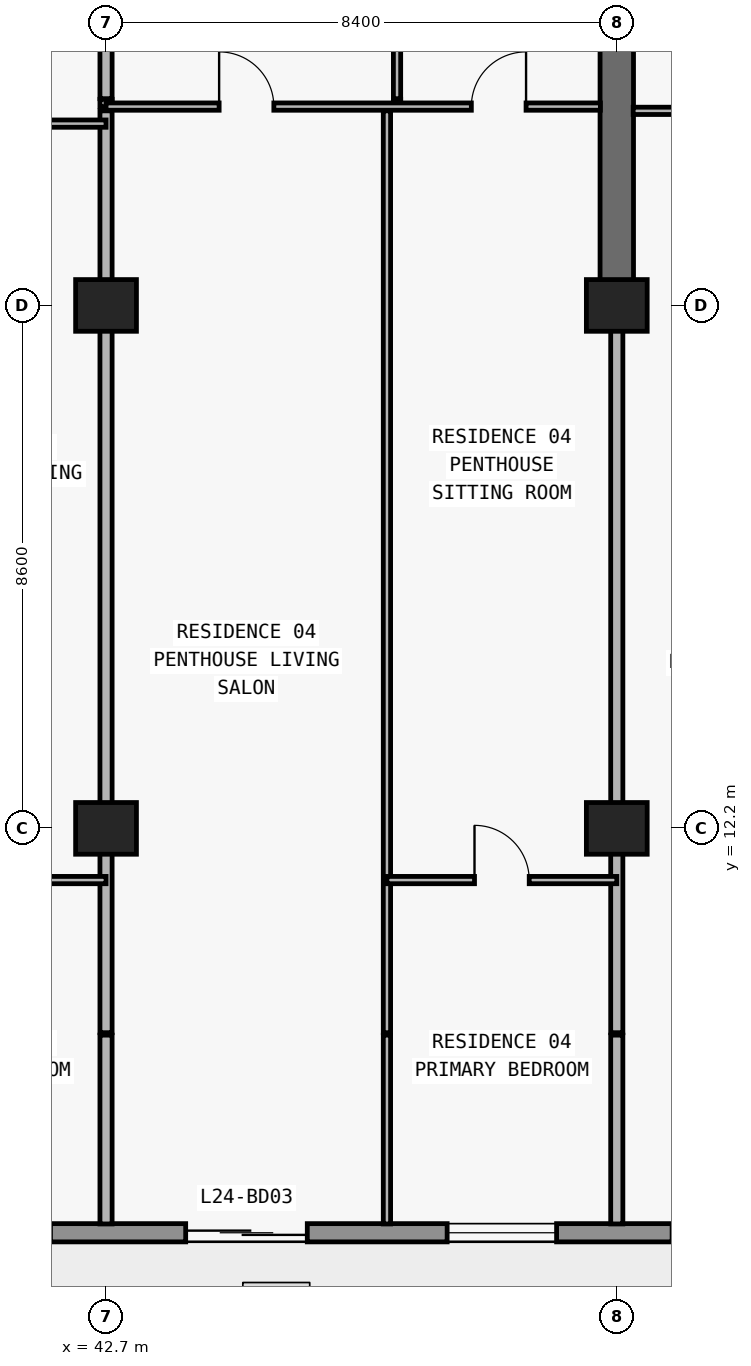
"""IFC4 building model, lengths in metres.
Left out: names, types, materials, properties, quantities, classifications, styles, units other than length and angle.
Written with IfcOpenShell. Run it as: python <this file> out.ifc"""

import sys

from ifc_helpers import new_model, si_unit, direction, frame, frame_2d, origin, origin_2d, place, context, subcontext, project, spatial, rectangle, extrude, element, fill, save


model = new_model("IFC4")
c1 = context("Model", 3, precision=1e-05, world=origin(), true_north=direction((0.0, 1.0)))
c2 = subcontext(c1, "Body", "Model", "MODEL_VIEW")
j1 = project(units=[si_unit("LENGTHUNIT", "METRE"), si_unit("PLANEANGLEUNIT", "RADIAN")], contexts=[c1])
p1 = place(None, origin())
s1 = spatial("IfcSite", under=j1, at=p1, CompositionType="ELEMENT")
p2 = place(p1, origin())
s2 = spatial("IfcBuilding", under=s1, at=p2, CompositionType="ELEMENT")
p3 = place(p2, frame((0.0, 0.0, 91.2)))
s3 = spatial("IfcBuildingStorey", under=s2, at=p3, CompositionType="ELEMENT", Elevation=91.2)
for number, where, z_axis, x_axis in (
    (1, (42.7, 12.2, 0.0), (0.0, 0.0, 1.0), (1.0, 0.0, 0.0)),
    (2, (51.1, 12.2, 0.0), (0.0, 0.0, 1.0), (1.0, 0.0, 0.0)),
    (3, (42.7, 20.8, 0.0), (0.0, 0.0, 1.0), (1.0, 0.0, 0.0)),
    (4, (51.1, 20.8, 0.0), (0.0, 0.0, 1.0), (1.0, 0.0, 0.0)),
):
    element("IfcColumn", number, at=place(p3, frame(where, z_axis=z_axis, x_axis=x_axis)), inside=s3, PredefinedType="COLUMN", context=c2, shape_type="SweptSolid", body=[
        extrude(rectangle(XDim=1.0, YDim=0.85, at=origin_2d()), origin(), (0.0, 0.0, 1.0), 3.05),
    ])
p4 = place(p3, frame((51.1, 20.8, 0.0), z_axis=(0.0, 0.0, 1.0), x_axis=(0.0, 1.0, 0.0)))
e5 = element("IfcWall", 5, at=p4, inside=s3, PredefinedType="SHEAR", context=c2, shape_type="SweptSolid", body=[
    extrude(rectangle(XDim=8.6, YDim=0.55, at=frame_2d((4.3, 0.0))), origin(), (0.0, 0.0, 1.0), 3.05),
])
p5 = place(p3, frame((70.1, 5.55, 0.0), z_axis=(0.0, 0.0, 1.0), x_axis=(-1.0, 0.0, 0.0)))
e6 = element("IfcWall", 6, at=p5, inside=s3, PredefinedType="STANDARD", context=c2, shape_type="SweptSolid", body=[
    extrude(rectangle(XDim=62.4, YDim=0.3, at=frame_2d((31.2, 0.0))), origin(), (0.0, 0.0, 1.0), 3.05),
])
p6 = place(p5, frame((57.29, 0.0, 0.0)))
e7 = element("IfcOpeningElement", 7, at=p6, cuts=e6, PredefinedType="OPENING", context=c2, shape_type="SweptSolid", body=[
    extrude(rectangle(XDim=2.0, YDim=2.3, at=frame_2d((1.0, 1.15))), frame((0.0, 0.16, 0.0), z_axis=(0.0, -1.0, 0.0), x_axis=(1.0, 0.0, 0.0)), (0.0, 0.0, 1.0), 0.32),
])
p7 = place(p5, frame((52.61, 0.0, 0.65)))
e8 = element("IfcOpeningElement", 8, at=p7, cuts=e6, PredefinedType="OPENING", context=c2, shape_type="SweptSolid", body=[
    extrude(rectangle(XDim=2.6, YDim=1.85, at=frame_2d((1.3, 0.925))), frame((0.0, 0.16, 0.0), z_axis=(0.0, -1.0, 0.0), x_axis=(1.0, 0.0, 0.0)), (0.0, 0.0, 1.0), 0.32),
])
p8 = place(p5, frame((46.5, 0.0, 0.85)))
e9 = element("IfcOpeningElement", 9, at=p8, cuts=e6, PredefinedType="OPENING", context=c2, shape_type="SweptSolid", body=[
    extrude(rectangle(XDim=2.2, YDim=1.55, at=frame_2d((1.1, 0.775))), frame((0.0, 0.16, 0.0), z_axis=(0.0, -1.0, 0.0), x_axis=(1.0, 0.0, 0.0)), (0.0, 0.0, 1.0), 0.32),
])
p9 = place(p5, frame((40.09, 0.0, 0.0)))
e10 = element("IfcOpeningElement", 10, at=p9, cuts=e6, PredefinedType="OPENING", context=c2, shape_type="SweptSolid", body=[
    extrude(rectangle(XDim=2.0, YDim=2.3, at=frame_2d((1.0, 1.15))), frame((0.0, 0.16, 0.0), z_axis=(0.0, -1.0, 0.0), x_axis=(1.0, 0.0, 0.0)), (0.0, 0.0, 1.0), 0.32),
])
p10 = place(p5, frame((35.99, 0.0, 0.85)))
e11 = element("IfcOpeningElement", 11, at=p10, cuts=e6, PredefinedType="OPENING", context=c2, shape_type="SweptSolid", body=[
    extrude(rectangle(XDim=1.8, YDim=1.55, at=frame_2d((0.9, 0.775))), frame((0.0, 0.16, 0.0), z_axis=(0.0, -1.0, 0.0), x_axis=(1.0, 0.0, 0.0)), (0.0, 0.0, 1.0), 0.32),
])
p11 = place(p5, frame((28.314, 0.0, 0.85)))
e12 = element("IfcOpeningElement", 12, at=p11, cuts=e6, PredefinedType="OPENING", context=c2, shape_type="SweptSolid", body=[
    extrude(rectangle(XDim=2.2, YDim=1.55, at=frame_2d((1.1, 0.775))), frame((0.0, 0.16, 0.0), z_axis=(0.0, -1.0, 0.0), x_axis=(1.0, 0.0, 0.0)), (0.0, 0.0, 1.0), 0.32),
])
p12 = place(p5, frame((24.09, 0.0, 0.0)))
e13 = element("IfcOpeningElement", 13, at=p12, cuts=e6, PredefinedType="OPENING", context=c2, shape_type="SweptSolid", body=[
    extrude(rectangle(XDim=2.0, YDim=2.3, at=frame_2d((1.0, 1.15))), frame((0.0, 0.16, 0.0), z_axis=(0.0, -1.0, 0.0), x_axis=(1.0, 0.0, 0.0)), (0.0, 0.0, 1.0), 0.32),
])
p13 = place(p5, frame((19.99, 0.0, 0.85)))
e14 = element("IfcOpeningElement", 14, at=p13, cuts=e6, PredefinedType="OPENING", context=c2, shape_type="SweptSolid", body=[
    extrude(rectangle(XDim=1.8, YDim=1.55, at=frame_2d((0.9, 0.775))), frame((0.0, 0.16, 0.0), z_axis=(0.0, -1.0, 0.0), x_axis=(1.0, 0.0, 0.0)), (0.0, 0.0, 1.0), 0.32),
])
p14 = place(p5, frame((16.09, 0.0, 0.0)))
e15 = element("IfcOpeningElement", 15, at=p14, cuts=e6, PredefinedType="OPENING", context=c2, shape_type="SweptSolid", body=[
    extrude(rectangle(XDim=2.0, YDim=2.3, at=frame_2d((1.0, 1.15))), frame((0.0, 0.16, 0.0), z_axis=(0.0, -1.0, 0.0), x_axis=(1.0, 0.0, 0.0)), (0.0, 0.0, 1.0), 0.32),
])
p15 = place(p5, frame((11.41, 0.0, 0.65)))
e16 = element("IfcOpeningElement", 16, at=p15, cuts=e6, PredefinedType="OPENING", context=c2, shape_type="SweptSolid", body=[
    extrude(rectangle(XDim=2.6, YDim=1.85, at=frame_2d((1.3, 0.925))), frame((0.0, 0.16, 0.0), z_axis=(0.0, -1.0, 0.0), x_axis=(1.0, 0.0, 0.0)), (0.0, 0.0, 1.0), 0.32),
])
p16 = place(p5, frame((5.3, 0.0, 0.85)))
e17 = element("IfcOpeningElement", 17, at=p16, cuts=e6, PredefinedType="OPENING", context=c2, shape_type="SweptSolid", body=[
    extrude(rectangle(XDim=2.2, YDim=1.55, at=frame_2d((1.1, 0.775))), frame((0.0, 0.16, 0.0), z_axis=(0.0, -1.0, 0.0), x_axis=(1.0, 0.0, 0.0)), (0.0, 0.0, 1.0), 0.32),
])
p17 = place(p3, frame((42.7, 5.695, 0.0), z_axis=(0.0, 0.0, 1.0), x_axis=(0.0, 1.0, 0.0)))
e18 = element("IfcWall", 18, at=p17, inside=s3, PredefinedType="PARTITIONING", context=c2, shape_type="SweptSolid", body=[
    extrude(rectangle(XDim=3.105, YDim=0.2, at=frame_2d((1.552, 0.0))), origin(), (0.0, 0.0, 1.0), 3.05),
])
p18 = place(p3, frame((42.7, 8.84, 0.0), z_axis=(0.0, 0.0, 1.0), x_axis=(0.0, 1.0, 0.0)))
e19 = element("IfcWall", 19, at=p18, inside=s3, PredefinedType="PARTITIONING", context=c2, shape_type="SweptSolid", body=[
    extrude(rectangle(XDim=15.16, YDim=0.2, at=frame_2d((7.58, 0.0))), origin(), (0.0, 0.0, 1.0), 2.174),
])
p19 = place(p3, frame((42.7, 24.07, 0.0), z_axis=(0.0, 0.0, 1.0), x_axis=(0.0, 1.0, 0.0)))
e20 = element("IfcWall", 20, at=p19, inside=s3, PredefinedType="PARTITIONING", context=c2, shape_type="SweptSolid", body=[
    extrude(rectangle(XDim=0.12, YDim=0.2, at=frame_2d((0.06, 0.0))), origin(), (0.0, 0.0, 1.0), 2.174),
])
p20 = place(p3, frame((42.7, 24.2, 0.0), z_axis=(0.0, 0.0, 1.0), x_axis=(0.0, 1.0, 0.0)))
e21 = element("IfcWall", 21, at=p20, inside=s3, PredefinedType="PARTITIONING", context=c2, shape_type="SweptSolid", body=[
    extrude(rectangle(XDim=5.14, YDim=0.2, at=frame_2d((2.57, 0.0))), origin(), (0.0, 0.0, 1.0), 2.174),
])
p21 = place(p3, frame((47.32, 5.695, 0.0), z_axis=(0.0, 0.0, 1.0), x_axis=(0.0, 1.0, 0.0)))
e22 = element("IfcWall", 22, at=p21, inside=s3, PredefinedType="PARTITIONING", context=c2, shape_type="SweptSolid", body=[
    extrude(rectangle(XDim=3.105, YDim=0.12, at=frame_2d((1.552, 0.0))), origin(), (0.0, 0.0, 1.0), 3.05),
])
p22 = place(p3, frame((47.32, 8.84, 0.0), z_axis=(0.0, 0.0, 1.0), x_axis=(0.0, 1.0, 0.0)))
e23 = element("IfcWall", 23, at=p22, inside=s3, PredefinedType="PARTITIONING", context=c2, shape_type="SweptSolid", body=[
    extrude(rectangle(XDim=15.16, YDim=0.12, at=frame_2d((7.58, 0.0))), origin(), (0.0, 0.0, 1.0), 3.05),
])
p23 = place(p3, frame((47.486, 24.07, 0.0), z_axis=(0.0, 0.0, 1.0), x_axis=(0.0, 1.0, 0.0)))
e24 = element("IfcWall", 24, at=p23, inside=s3, PredefinedType="PARTITIONING", context=c2, shape_type="SweptSolid", body=[
    extrude(rectangle(XDim=0.12, YDim=0.12, at=frame_2d((0.06, 0.0))), origin(), (0.0, 0.0, 1.0), 3.05),
])
p24 = place(p3, frame((47.486, 24.2, 0.0), z_axis=(0.0, 0.0, 1.0), x_axis=(0.0, 1.0, 0.0)))
e25 = element("IfcWall", 25, at=p24, inside=s3, PredefinedType="PARTITIONING", context=c2, shape_type="SweptSolid", body=[
    extrude(rectangle(XDim=5.02, YDim=0.12, at=frame_2d((2.51, 0.0))), origin(), (0.0, 0.0, 1.0), 3.05),
])
p25 = place(p24, frame((2.06, 0.0, 0.0)))
e26 = element("IfcOpeningElement", 26, at=p25, cuts=e25, PredefinedType="OPENING", context=c2, shape_type="SweptSolid", body=[
    extrude(rectangle(XDim=0.9, YDim=2.15, at=frame_2d((0.45, 1.075))), frame((0.0, 0.07, 0.0), z_axis=(0.0, -1.0, 0.0), x_axis=(1.0, 0.0, 0.0)), (0.0, 0.0, 1.0), 0.14),
])
p26 = place(p3, frame((51.1, 5.695, 0.0), z_axis=(0.0, 0.0, 1.0), x_axis=(0.0, 1.0, 0.0)))
e27 = element("IfcWall", 27, at=p26, inside=s3, PredefinedType="PARTITIONING", context=c2, shape_type="SweptSolid", body=[
    extrude(rectangle(XDim=3.105, YDim=0.2, at=frame_2d((1.552, 0.0))), origin(), (0.0, 0.0, 1.0), 3.05),
])
p27 = place(p3, frame((51.1, 8.84, 0.0), z_axis=(0.0, 0.0, 1.0), x_axis=(0.0, 1.0, 0.0)))
e28 = element("IfcWall", 28, at=p27, inside=s3, PredefinedType="PARTITIONING", context=c2, shape_type="SweptSolid", body=[
    extrude(rectangle(XDim=11.955, YDim=0.2, at=frame_2d((5.978, 0.0))), origin(), (0.0, 0.0, 1.0), 2.174),
])
p28 = place(p3, frame((38.672, 11.35, 0.0), z_axis=(0.0, 0.0, 1.0), x_axis=(1.0, 0.0, 0.0)))
e29 = element("IfcWall", 29, at=p28, inside=s3, PredefinedType="PARTITIONING", context=c2, shape_type="SweptSolid", body=[
    extrude(rectangle(XDim=4.028, YDim=0.12, at=frame_2d((2.014, 0.0))), origin(), (0.0, 0.0, 1.0), 3.05),
])
p29 = place(p28, frame((1.564, 0.0, 0.0)))
e30 = element("IfcOpeningElement", 30, at=p29, cuts=e29, PredefinedType="OPENING", context=c2, shape_type="SweptSolid", body=[
    extrude(rectangle(XDim=0.9, YDim=2.15, at=frame_2d((0.45, 1.075))), frame((0.0, 0.07, 0.0), z_axis=(0.0, -1.0, 0.0), x_axis=(1.0, 0.0, 0.0)), (0.0, 0.0, 1.0), 0.14),
])
p30 = place(p3, frame((47.32, 11.35, 0.0), z_axis=(0.0, 0.0, 1.0), x_axis=(1.0, 0.0, 0.0)))
e31 = element("IfcWall", 31, at=p30, inside=s3, PredefinedType="PARTITIONING", context=c2, shape_type="SweptSolid", body=[
    extrude(rectangle(XDim=3.78, YDim=0.12, at=frame_2d((1.89, 0.0))), origin(), (0.0, 0.0, 1.0), 3.05),
])
p31 = place(p30, frame((1.44, 0.0, 0.0)))
e32 = element("IfcOpeningElement", 32, at=p31, cuts=e31, PredefinedType="OPENING", context=c2, shape_type="SweptSolid", body=[
    extrude(rectangle(XDim=0.9, YDim=2.15, at=frame_2d((0.45, 1.075))), frame((0.0, 0.07, 0.0), z_axis=(0.0, -1.0, 0.0), x_axis=(1.0, 0.0, 0.0)), (0.0, 0.0, 1.0), 0.14),
])
p32 = place(p3, frame((35.1, 23.79, 0.0), z_axis=(0.0, 0.0, 1.0), x_axis=(1.0, 0.0, 0.0)))
e33 = element("IfcWall", 33, at=p32, inside=s3, PredefinedType="PARTITIONING", context=c2, shape_type="SweptSolid", body=[
    extrude(rectangle(XDim=7.6, YDim=0.12, at=frame_2d((3.8, 0.0))), origin(), (0.0, 0.0, 1.0), 3.05),
])
p33 = place(p32, frame((1.336, 0.0, 0.0)))
e34 = element("IfcOpeningElement", 34, at=p33, cuts=e33, PredefinedType="OPENING", context=c2, shape_type="SweptSolid", body=[
    extrude(rectangle(XDim=0.9, YDim=2.15, at=frame_2d((0.45, 1.075))), frame((0.0, 0.07, 0.0), z_axis=(0.0, -1.0, 0.0), x_axis=(1.0, 0.0, 0.0)), (0.0, 0.0, 1.0), 0.14),
])
p34 = place(p32, frame((5.402, 0.0, 0.0)))
e35 = element("IfcOpeningElement", 35, at=p34, cuts=e33, PredefinedType="OPENING", context=c2, shape_type="SweptSolid", body=[
    extrude(rectangle(XDim=0.9, YDim=2.15, at=frame_2d((0.45, 1.075))), frame((0.0, 0.07, 0.0), z_axis=(0.0, -1.0, 0.0), x_axis=(1.0, 0.0, 0.0)), (0.0, 0.0, 1.0), 0.14),
])
p35 = place(p3, frame((51.37, 24.0, 0.0), z_axis=(0.0, 0.0, 1.0), x_axis=(1.0, 0.0, 0.0)))
e36 = element("IfcWall", 36, at=p35, inside=s3, PredefinedType="PARTITIONING", context=c2, shape_type="SweptSolid", body=[
    extrude(rectangle(XDim=8.13, YDim=0.12, at=frame_2d((4.065, 0.0))), origin(), (0.0, 0.0, 1.0), 3.05),
])
p36 = place(p35, frame((1.305, 0.0, 0.0)))
e37 = element("IfcOpeningElement", 37, at=p36, cuts=e36, PredefinedType="OPENING", context=c2, shape_type="SweptSolid", body=[
    extrude(rectangle(XDim=0.9, YDim=2.15, at=frame_2d((0.45, 1.075))), frame((0.0, 0.07, 0.0), z_axis=(0.0, -1.0, 0.0), x_axis=(1.0, 0.0, 0.0)), (0.0, 0.0, 1.0), 0.14),
])
p37 = place(p3, frame((42.7, 24.07, 0.0), z_axis=(0.0, 0.0, 1.0), x_axis=(1.0, 0.0, 0.0)))
e38 = element("IfcWall", 38, at=p37, inside=s3, PredefinedType="PARTITIONING", context=c2, shape_type="SweptSolid", body=[
    extrude(rectangle(XDim=8.13, YDim=0.12, at=frame_2d((4.065, 0.0))), origin(), (0.0, 0.0, 1.0), 3.05),
])
p38 = place(p37, frame((1.86, 0.0, 0.0)))
e39 = element("IfcOpeningElement", 39, at=p38, cuts=e38, PredefinedType="OPENING", context=c2, shape_type="SweptSolid", body=[
    extrude(rectangle(XDim=0.9, YDim=2.15, at=frame_2d((0.45, 1.075))), frame((0.0, 0.07, 0.0), z_axis=(0.0, -1.0, 0.0), x_axis=(1.0, 0.0, 0.0)), (0.0, 0.0, 1.0), 0.14),
])
p39 = place(p37, frame((6.008, 0.0, 0.0)))
e40 = element("IfcOpeningElement", 40, at=p39, cuts=e38, PredefinedType="OPENING", context=c2, shape_type="SweptSolid", body=[
    extrude(rectangle(XDim=0.9, YDim=2.15, at=frame_2d((0.45, 1.075))), frame((0.0, 0.07, 0.0), z_axis=(0.0, -1.0, 0.0), x_axis=(1.0, 0.0, 0.0)), (0.0, 0.0, 1.0), 0.14),
])
p40 = place(p12, origin())
e41 = element("IfcDoor", 41, at=p40, inside=s3, OperationType="DOUBLE_DOOR_SLIDING", PredefinedType="DOOR", context=c2, shape_type="SweptSolid", body=[
    extrude(rectangle(XDim=2.0, YDim=2.3, at=frame_2d((1.0, 1.15))), frame((0.0, 0.025, 0.0), z_axis=(0.0, -1.0, 0.0), x_axis=(1.0, 0.0, 0.0)), (0.0, 0.0, 1.0), 0.05),
])
fill(e13, e41)
p41 = place(p13, origin())
e42 = element("IfcWindow", 42, at=p41, inside=s3, PartitioningType="SINGLE_PANEL", PredefinedType="WINDOW", context=c2, shape_type="SweptSolid", body=[
    extrude(rectangle(XDim=1.8, YDim=1.55, at=frame_2d((0.9, 0.775))), frame((0.0, 0.03, 0.0), z_axis=(0.0, -1.0, 0.0), x_axis=(1.0, 0.0, 0.0)), (0.0, 0.0, 1.0), 0.06),
])
fill(e14, e42)
p42 = place(p38, origin())
e43 = element("IfcDoor", 43, at=p42, inside=s3, OperationType="SINGLE_SWING_LEFT", PredefinedType="DOOR", context=c2, shape_type="SweptSolid", body=[
    extrude(rectangle(XDim=0.9, YDim=2.15, at=frame_2d((0.45, 1.075))), frame((0.0, 0.025, 0.0), z_axis=(0.0, -1.0, 0.0), x_axis=(1.0, 0.0, 0.0)), (0.0, 0.0, 1.0), 0.05),
])
fill(e39, e43)
p43 = place(p39, origin())
e44 = element("IfcDoor", 44, at=p43, inside=s3, OperationType="SINGLE_SWING_RIGHT", PredefinedType="DOOR", context=c2, shape_type="SweptSolid", body=[
    extrude(rectangle(XDim=0.9, YDim=2.15, at=frame_2d((0.45, 1.075))), frame((0.0, 0.025, 0.0), z_axis=(0.0, -1.0, 0.0), x_axis=(1.0, 0.0, 0.0)), (0.0, 0.0, 1.0), 0.05),
])
fill(e40, e44)
p44 = place(p31, origin())
e45 = element("IfcDoor", 45, at=p44, inside=s3, OperationType="SINGLE_SWING_LEFT", PredefinedType="DOOR", context=c2, shape_type="SweptSolid", body=[
    extrude(rectangle(XDim=0.9, YDim=2.15, at=frame_2d((0.45, 1.075))), frame((0.0, 0.025, 0.0), z_axis=(0.0, -1.0, 0.0), x_axis=(1.0, 0.0, 0.0)), (0.0, 0.0, 1.0), 0.05),
])
fill(e32, e45)
save(model, sys.argv[1])
